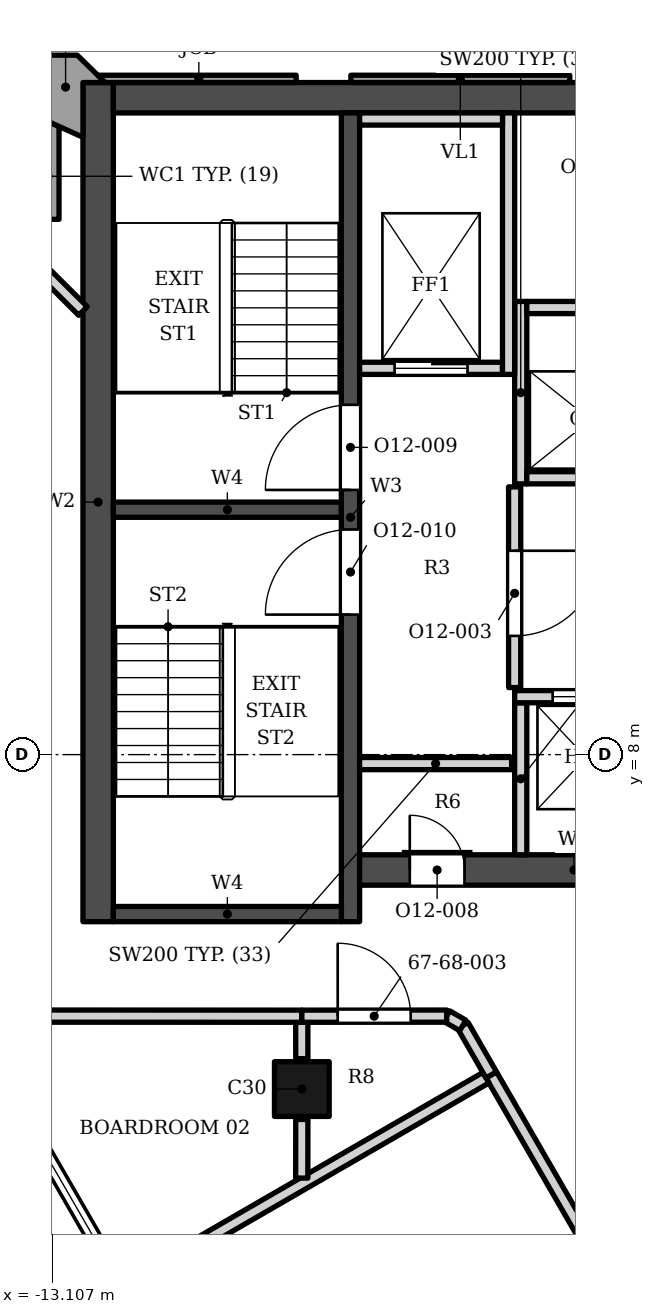
"""IFC4 building model, lengths in metres.
Left out: names, types, materials, properties, quantities, classifications, styles, units other than length and angle.
Written with IfcOpenShell. Run it as: python <this file> out.ifc"""

import sys

from ifc_helpers import new_model, si_unit, direction, frame, frame_2d, origin, origin_2d, place, context, subcontext, project, spatial, polyline, rectangle, outline, extrude, element, fill, save


model = new_model("IFC4")
c1 = context("Model", 3, precision=1e-05, world=origin(), true_north=direction((0.0, 1.0)))
c2 = subcontext(c1, "Body", "Model", "MODEL_VIEW")
j1 = project(units=[si_unit("LENGTHUNIT", "METRE"), si_unit("PLANEANGLEUNIT", "RADIAN")], contexts=[c1])
p1 = place(None, origin())
s1 = spatial("IfcSite", under=j1, at=p1, CompositionType="ELEMENT")
p2 = place(p1, origin())
s2 = spatial("IfcBuilding", under=s1, at=p2, CompositionType="ELEMENT")
p3 = place(p2, frame((0.0, 0.0, 279.4)))
s3 = spatial("IfcBuildingStorey", under=s2, at=p3, CompositionType="ELEMENT", Elevation=279.4)
p4 = place(p3, frame((-12.1, 18.802, 0.0), z_axis=(0.0, 0.0, 1.0), x_axis=(1.0, 0.0, 0.0)))
e1 = element("IfcWall", 1, at=p4, inside=s3, PredefinedType="SHEAR", context=c2, shape_type="SweptSolid", body=[
    extrude(rectangle(XDim=24.2, YDim=0.5, at=frame_2d((12.1, 0.0))), origin(), (0.0, 0.0, 1.0), 3.9),
])
p5 = place(p3, frame((-12.35, 5.253, 0.0), z_axis=(0.0, 0.0, 1.0), x_axis=(0.0, 1.0, 0.0)))
e2 = element("IfcWall", 2, at=p5, inside=s3, PredefinedType="SHEAR", context=c2, shape_type="SweptSolid", body=[
    extrude(rectangle(XDim=13.8, YDim=0.5, at=frame_2d((6.9, 0.0))), origin(), (0.0, 0.0, 1.0), 3.9),
])
p6 = place(p3, frame((-8.2, 5.253, 0.0), z_axis=(0.0, 0.0, 1.0), x_axis=(0.0, 1.0, 0.0)))
e3 = element("IfcWall", 3, at=p6, inside=s3, PredefinedType="SHEAR", context=c2, shape_type="SweptSolid", body=[
    extrude(rectangle(XDim=13.3, YDim=0.3, at=frame_2d((6.65, 0.0))), origin(), (0.0, 0.0, 1.0), 3.9),
])
p7 = place(p6, frame((7.1, 0.0, 0.0)))
e4 = element("IfcOpeningElement", 4, at=p7, cuts=e3, PredefinedType="OPENING", context=c2, shape_type="SweptSolid", body=[
    extrude(rectangle(XDim=1.4, YDim=2.1, at=frame_2d((0.7, 1.05))), frame((0.0, 0.16, 0.0), z_axis=(0.0, -1.0, 0.0), x_axis=(1.0, 0.0, 0.0)), (0.0, 0.0, 1.0), 0.32),
])
p8 = place(p6, frame((5.05, 0.0, 0.0)))
e5 = element("IfcOpeningElement", 5, at=p8, cuts=e3, PredefinedType="OPENING", context=c2, shape_type="SweptSolid", body=[
    extrude(rectangle(XDim=1.4, YDim=2.1, at=frame_2d((0.7, 1.05))), frame((0.0, 0.16, 0.0), z_axis=(0.0, -1.0, 0.0), x_axis=(1.0, 0.0, 0.0)), (0.0, 0.0, 1.0), 0.32),
])
for number, where, z_axis, x_axis in (
    (6, (-12.1, 12.028, 0.0), (0.0, 0.0, 1.0), (1.0, 0.0, 0.0)),
    (7, (-12.1, 5.378, 0.0), (0.0, 0.0, 1.0), (1.0, 0.0, 0.0)),
):
    element("IfcWall", number, at=place(p3, frame(where, z_axis=z_axis, x_axis=x_axis)), inside=s3, PredefinedType="SHEAR", context=c2, shape_type="SweptSolid", body=[
        extrude(rectangle(XDim=3.75, YDim=0.25, at=frame_2d((1.875, 0.0))), origin(), (0.0, 0.0, 1.0), 3.9),
    ])
p9 = place(p3, frame((-8.05, 6.103, 0.0), z_axis=(0.0, 0.0, 1.0), x_axis=(1.0, 0.0, 0.0)))
e8 = element("IfcWall", 8, at=p9, inside=s3, PredefinedType="SHEAR", context=c2, shape_type="SweptSolid", body=[
    extrude(rectangle(XDim=7.05, YDim=0.5, at=frame_2d((3.525, 0.0))), origin(), (0.0, 0.0, 1.0), 3.9),
])
p10 = place(p9, frame((0.825, 0.0, 0.0)))
e9 = element("IfcOpeningElement", 9, at=p10, cuts=e8, PredefinedType="OPENING", context=c2, shape_type="SweptSolid", body=[
    extrude(rectangle(XDim=0.9, YDim=2.1, at=frame_2d((0.45, 1.05))), frame((0.0, 0.26, 0.0), z_axis=(0.0, -1.0, 0.0), x_axis=(1.0, 0.0, 0.0)), (0.0, 0.0, 1.0), 0.52),
])
p11 = place(p3, frame((-9.0, 2.5, 0.0), z_axis=(0.0, 0.0, 1.0), x_axis=(1.0, 0.0, 0.0)))
e10 = element("IfcColumn", 10, at=p11, inside=s3, PredefinedType="COLUMN", context=c2, shape_type="SweptSolid", body=[
    extrude(rectangle(XDim=0.9, YDim=0.9, at=origin_2d()), origin(), (0.0, 0.0, 1.0), 3.9),
])
p12 = place(p3, frame((-14.12, 3.001, 0.0), z_axis=(0.0, 0.0, 1.0), x_axis=(0.49998411664, -0.866034573852, 0.0)))
e11 = element("IfcWall", 11, at=p12, inside=s3, PredefinedType="ELEMENTEDWALL", context=c2, shape_type="SweptSolid", body=[
    extrude(rectangle(XDim=4.2, YDim=0.2, at=frame_2d((2.1, 0.0))), origin(), (0.0, 0.0, 1.0), 3.0),
])
p13 = place(p12, frame((0.2, 0.0, 0.45)))
e12 = element("IfcOpeningElement", 12, at=p13, cuts=e11, PredefinedType="OPENING", context=c2, shape_type="SweptSolid", body=[
    extrude(rectangle(XDim=3.8, YDim=2.25, at=frame_2d((1.9, 1.125))), frame((0.0, 0.11, 0.0), z_axis=(0.0, -1.0, 0.0), x_axis=(1.0, 0.0, 0.0)), (0.0, 0.0, 1.0), 0.22),
])
p14 = place(p3, origin())
e13 = element("IfcWall", 13, at=p14, inside=s3, PredefinedType="SOLIDWALL", context=c2, shape_type="SweptSolid", body=[
    extrude(outline(polyline([(-12.234, 19.052), (-12.694, 19.502), (-13.594, 19.502), (-13.594, 18.603), (-12.6, 18.152), (-12.6, 19.052), (-12.234, 19.052)])), origin(), (0.0, 0.0, 1.0), 3.0),
])
p15 = place(p3, origin())
e14 = element("IfcWall", 14, at=p15, inside=s3, PredefinedType="SOLIDWALL", context=c2, shape_type="SweptSolid", body=[
    extrude(outline(polyline([(-13.294, 16.802), (-12.994, 16.802), (-12.994, 18.331), (-13.294, 18.467), (-13.294, 17.153), (-13.294, 16.802)])), origin(), (0.0, 0.0, 1.0), 3.0),
])
p16 = place(p3, origin())
e15 = element("IfcWall", 15, at=p16, inside=s3, PredefinedType="ELEMENTEDWALL", context=c2, shape_type="SweptSolid", body=[
    extrude(outline(polyline([(-8.194, 19.173), (-8.194, 19.052), (-4.594, 19.052), (-4.594, 19.173), (-8.194, 19.173)])), origin(), (0.0, 0.0, 1.0), 3.0),
])
p17 = place(p3, origin())
e16 = element("IfcWall", 16, at=p17, inside=s3, PredefinedType="SOLIDWALL", context=c2, shape_type="SweptSolid", body=[
    extrude(outline(polyline([(-12.233, 19.052), (-9.094, 19.052), (-9.094, 19.173), (-12.355, 19.173), (-12.233, 19.052)])), origin(), (0.0, 0.0, 1.0), 3.0),
])
for number, where, z_axis, x_axis in (
    (17, (-5.4, 6.353, 0.0), (0.0, 0.0, 1.0), (0.0, 1.0, 0.0)),
    (18, (-8.05, 7.853, 0.0), (0.0, 0.0, 1.0), (1.0, 0.0, 0.0)),
):
    element("IfcWall", number, at=place(p3, frame(where, z_axis=z_axis, x_axis=x_axis)), inside=s3, PredefinedType="SOLIDWALL", context=c2, shape_type="SweptSolid", body=[
        extrude(rectangle(XDim=2.5, YDim=0.2, at=frame_2d((1.25, 0.0))), origin(), (0.0, 0.0, 1.0), 3.73),
    ])
p18 = place(p3, frame((-5.5, 8.953, 0.0), z_axis=(0.0, 0.0, 1.0), x_axis=(1.0, 0.0, 0.0)))
e19 = element("IfcWall", 19, at=p18, inside=s3, PredefinedType="SOLIDWALL", context=c2, shape_type="SweptSolid", body=[
    extrude(rectangle(XDim=4.5, YDim=0.2, at=frame_2d((2.25, 0.0))), origin(), (0.0, 0.0, 1.0), 3.73),
])
p19 = place(p18, frame((0.625, 0.0, 0.0)))
e20 = element("IfcOpeningElement", 20, at=p19, cuts=e19, PredefinedType="OPENING", context=c2, shape_type="SweptSolid", body=[
    extrude(rectangle(XDim=1.1, YDim=2.1, at=frame_2d((0.55, 1.05))), frame((0.0, 0.11, 0.0), z_axis=(0.0, -1.0, 0.0), x_axis=(1.0, 0.0, 0.0)), (0.0, 0.0, 1.0), 0.22),
])
p20 = place(p18, frame((2.775, 0.0, 0.0)))
e21 = element("IfcOpeningElement", 21, at=p20, cuts=e19, PredefinedType="OPENING", context=c2, shape_type="SweptSolid", body=[
    extrude(rectangle(XDim=1.1, YDim=2.1, at=frame_2d((0.55, 1.05))), frame((0.0, 0.11, 0.0), z_axis=(0.0, -1.0, 0.0), x_axis=(1.0, 0.0, 0.0)), (0.0, 0.0, 1.0), 0.22),
])
p21 = place(p3, frame((-5.5, 9.103, 0.0), z_axis=(0.0, 0.0, 1.0), x_axis=(0.0, 1.0, 0.0)))
e22 = element("IfcWall", 22, at=p21, inside=s3, PredefinedType="SOLIDWALL", context=c2, shape_type="SweptSolid", body=[
    extrude(rectangle(XDim=3.3, YDim=0.2, at=frame_2d((1.65, 0.0))), origin(), (0.0, 0.0, 1.0), 3.73),
])
p22 = place(p21, frame((0.85, 0.0, 0.0)))
e23 = element("IfcOpeningElement", 23, at=p22, cuts=e22, PredefinedType="OPENING", context=c2, shape_type="SweptSolid", body=[
    extrude(rectangle(XDim=1.4, YDim=2.1, at=frame_2d((0.7, 1.05))), frame((0.0, 0.11, 0.0), z_axis=(0.0, -1.0, 0.0), x_axis=(1.0, 0.0, 0.0)), (0.0, 0.0, 1.0), 0.22),
])
p23 = place(p3, frame((-5.4, 12.453, 0.0), z_axis=(0.0, 0.0, 1.0), x_axis=(0.0, 1.0, 0.0)))
e24 = element("IfcWall", 24, at=p23, inside=s3, PredefinedType="SOLIDWALL", context=c2, shape_type="SweptSolid", body=[
    extrude(rectangle(XDim=3.0, YDim=0.2, at=frame_2d((1.5, 0.0))), origin(), (0.0, 0.0, 1.0), 3.73),
])
p24 = place(p3, frame((-5.3, 12.552, 0.0), z_axis=(0.0, 0.0, 1.0), x_axis=(1.0, 0.0, 0.0)))
e25 = element("IfcWall", 25, at=p24, inside=s3, PredefinedType="SOLIDWALL", context=c2, shape_type="SweptSolid", body=[
    extrude(rectangle(XDim=2.1, YDim=0.2, at=frame_2d((1.05, 0.0))), origin(), (0.0, 0.0, 1.0), 3.73),
])
p25 = place(p3, frame((-8.05, 14.353, 0.0), z_axis=(0.0, 0.0, 1.0), x_axis=(1.0, 0.0, 0.0)))
e26 = element("IfcWall", 26, at=p25, inside=s3, PredefinedType="SOLIDWALL", context=c2, shape_type="SweptSolid", body=[
    extrude(rectangle(XDim=2.35, YDim=0.2, at=frame_2d((1.175, 0.0))), origin(), (0.0, 0.0, 1.0), 3.73),
])
p26 = place(p25, frame((0.575, 0.0, 0.0)))
e27 = element("IfcOpeningElement", 27, at=p26, cuts=e26, PredefinedType="OPENING", context=c2, shape_type="SweptSolid", body=[
    extrude(rectangle(XDim=1.2, YDim=2.1, at=frame_2d((0.6, 1.05))), frame((0.0, 0.11, 0.0), z_axis=(0.0, -1.0, 0.0), x_axis=(1.0, 0.0, 0.0)), (0.0, 0.0, 1.0), 0.22),
])
p27 = place(p3, frame((-5.6, 14.253, 0.0), z_axis=(0.0, 0.0, 1.0), x_axis=(0.0, 1.0, 0.0)))
e28 = element("IfcWall", 28, at=p27, inside=s3, PredefinedType="SOLIDWALL", context=c2, shape_type="SweptSolid", body=[
    extrude(rectangle(XDim=4.3, YDim=0.2, at=frame_2d((2.15, 0.0))), origin(), (0.0, 0.0, 1.0), 3.73),
])
p28 = place(p3, frame((-5.3, 15.353, 0.0), z_axis=(0.0, 0.0, 1.0), x_axis=(1.0, 0.0, 0.0)))
e29 = element("IfcWall", 29, at=p28, inside=s3, PredefinedType="SOLIDWALL", context=c2, shape_type="SweptSolid", body=[
    extrude(rectangle(XDim=2.1, YDim=0.2, at=frame_2d((1.05, 0.0))), origin(), (0.0, 0.0, 1.0), 3.73),
])
p29 = place(p3, frame((-8.05, 18.453, 0.0), z_axis=(0.0, 0.0, 1.0), x_axis=(1.0, 0.0, 0.0)))
e30 = element("IfcWall", 30, at=p29, inside=s3, PredefinedType="SOLIDWALL", context=c2, shape_type="SweptSolid", body=[
    extrude(rectangle(XDim=2.35, YDim=0.2, at=frame_2d((1.175, 0.0))), origin(), (0.0, 0.0, 1.0), 3.73),
])
p30 = place(p3, frame((-5.885, 2.733, 0.0), z_axis=(0.0, 0.0, 1.0), x_axis=(0.499999199346, -0.866025866042, 0.0)))
e31 = element("IfcWall", 31, at=p30, inside=s3, PredefinedType="PARTITIONING", context=c2, shape_type="SweptSolid", body=[
    extrude(rectangle(XDim=12.04, YDim=0.2, at=frame_2d((6.02, 0.0))), origin(), (0.0, 0.0, 1.0), 2.884),
])
p31 = place(p30, frame((4.0, 0.0, 0.0)))
e32 = element("IfcOpeningElement", 32, at=p31, cuts=e31, PredefinedType="OPENING", context=c2, shape_type="SweptSolid", body=[
    extrude(rectangle(XDim=1.0, YDim=2.4, at=frame_2d((0.5, 1.2))), frame((0.0, 0.11, 0.0), z_axis=(0.0, -1.0, 0.0), x_axis=(1.0, 0.0, 0.0)), (0.0, 0.0, 1.0), 0.22),
])
p32 = place(p30, frame((9.52, 0.0, 0.0)))
e33 = element("IfcOpeningElement", 33, at=p32, cuts=e31, PredefinedType="OPENING", context=c2, shape_type="SweptSolid", body=[
    extrude(rectangle(XDim=1.8, YDim=2.4, at=frame_2d((0.9, 1.2))), frame((0.0, 0.11, 0.0), z_axis=(0.0, -1.0, 0.0), x_axis=(1.0, 0.0, 0.0)), (0.0, 0.0, 1.0), 0.22),
])
p33 = place(p3, frame((-11.556, -0.541, 0.0), z_axis=(0.0, 0.0, 1.0), x_axis=(0.865781982927, 0.500421380478, 0.0)))
e34 = element("IfcWall", 34, at=p33, inside=s3, PredefinedType="PARTITIONING", context=c2, shape_type="SweptSolid", body=[
    extrude(rectangle(XDim=6.45, YDim=0.2, at=frame_2d((3.225, 0.0))), origin(), (0.0, 0.0, 1.0), 3.202),
])
p34 = place(p3, frame((-9.002, 1.036, 0.0), z_axis=(0.0, 0.0, 1.0), x_axis=(0.001518985589, 0.999998846341, 0.0)))
e35 = element("IfcWall", 35, at=p34, inside=s3, PredefinedType="PARTITIONING", context=c2, shape_type="SweptSolid", body=[
    extrude(rectangle(XDim=0.964, YDim=0.2, at=frame_2d((0.482, 0.0))), origin(), (0.0, 0.0, 1.0), 3.202),
])
p35 = place(p3, frame((-6.353, 3.546, 0.0), z_axis=(0.0, 0.0, 1.0), x_axis=(0.498715622975, -0.86676567041, 0.0)))
e36 = element("IfcWall", 36, at=p35, inside=s3, PredefinedType="PARTITIONING", context=c2, shape_type="SweptSolid", body=[
    extrude(rectangle(XDim=0.938, YDim=0.2, at=frame_2d((0.469, 0.0))), origin(), (0.0, 0.0, 1.0), 3.73),
])
p36 = place(p3, frame((-9.002, 3.6, 0.0), z_axis=(0.0, 0.0, 1.0), x_axis=(0.002442989453, -0.999997015897, 0.0)))
e37 = element("IfcWall", 37, at=p36, inside=s3, PredefinedType="PARTITIONING", context=c2, shape_type="SweptSolid", body=[
    extrude(rectangle(XDim=0.6, YDim=0.2, at=frame_2d((0.3, 0.0))), origin(), (0.0, 0.0, 1.0), 3.332),
])
p37 = place(p3, frame((-6.618, 3.699, 0.0), z_axis=(0.0, 0.0, 1.0), x_axis=(0.865826662844, -0.500344071524, 0.0)))
e38 = element("IfcWall", 38, at=p37, inside=s3, PredefinedType="PARTITIONING", context=c2, shape_type="SweptSolid", body=[
    extrude(rectangle(XDim=0.306, YDim=0.2, at=frame_2d((0.153, 0.0))), origin(), (0.0, 0.0, 1.0), 3.73),
])
p38 = place(p3, frame((-13.277, 3.7, 0.0), z_axis=(0.0, 0.0, 1.0), x_axis=(0.999999920155, -0.000399611774, 0.0)))
e39 = element("IfcWall", 39, at=p38, inside=s3, PredefinedType="PARTITIONING", context=c2, shape_type="SweptSolid", body=[
    extrude(rectangle(XDim=4.277, YDim=0.2, at=frame_2d((2.138, 0.0))), origin(), (0.0, 0.0, 1.0), 3.73),
])
p39 = place(p3, frame((-9.0, 3.698, 0.0), z_axis=(0.0, 0.0, 1.0), x_axis=(0.999999810961, 0.000614879982, 0.0)))
e40 = element("IfcWall", 40, at=p39, inside=s3, PredefinedType="PARTITIONING", context=c2, shape_type="SweptSolid", body=[
    extrude(rectangle(XDim=2.382, YDim=0.2, at=frame_2d((1.191, 0.0))), origin(), (0.0, 0.0, 1.0), 3.73),
])
p40 = place(p39, frame((0.59, 0.0, 0.0)))
e41 = element("IfcOpeningElement", 41, at=p40, cuts=e40, PredefinedType="OPENING", context=c2, shape_type="SweptSolid", body=[
    extrude(rectangle(XDim=1.2, YDim=2.4, at=frame_2d((0.6, 1.2))), frame((0.0, 0.11, 0.0), z_axis=(0.0, -1.0, 0.0), x_axis=(1.0, 0.0, 0.0)), (0.0, 0.0, 1.0), 0.22),
])
p41 = place(p3, frame((-13.26, 15.953, 0.0), z_axis=(0.0, 0.0, 1.0), x_axis=(0.708285399161, -0.705926195389, 0.0)))
e42 = element("IfcWall", 42, at=p41, inside=s3, PredefinedType="PARTITIONING", context=c2, shape_type="SweptSolid", body=[
    extrude(rectangle(XDim=0.931, YDim=0.2, at=frame_2d((0.466, 0.0))), origin(), (0.0, 0.0, 1.0), 3.73),
])
p42 = place(p13, origin())
e43 = element("IfcWindow", 43, at=p42, inside=s3, PartitioningType="SINGLE_PANEL", PredefinedType="WINDOW", context=c2, shape_type="SweptSolid", body=[
    extrude(rectangle(XDim=3.8, YDim=2.25, at=frame_2d((1.9, 1.125))), frame((0.0, 0.03, 0.0), z_axis=(0.0, -1.0, 0.0), x_axis=(1.0, 0.0, 0.0)), (0.0, 0.0, 1.0), 0.06),
])
fill(e12, e43)
p43 = place(p19, origin())
e44 = element("IfcDoor", 44, at=p43, inside=s3, OperationType="DOUBLE_DOOR_SLIDING", PredefinedType="DOOR", context=c2, shape_type="SweptSolid", body=[
    extrude(rectangle(XDim=1.1, YDim=2.1, at=frame_2d((0.55, 1.05))), frame((0.0, 0.025, 0.0), z_axis=(0.0, -1.0, 0.0), x_axis=(1.0, 0.0, 0.0)), (0.0, 0.0, 1.0), 0.05),
])
fill(e20, e44)
p44 = place(p26, origin())
e45 = element("IfcDoor", 45, at=p44, inside=s3, OperationType="DOUBLE_DOOR_SLIDING", PredefinedType="DOOR", context=c2, shape_type="SweptSolid", body=[
    extrude(rectangle(XDim=1.2, YDim=2.1, at=frame_2d((0.6, 1.05))), frame((0.0, 0.025, 0.0), z_axis=(0.0, -1.0, 0.0), x_axis=(1.0, 0.0, 0.0)), (0.0, 0.0, 1.0), 0.05),
])
fill(e27, e45)
p45 = place(p7, origin())
e46 = element("IfcDoor", 46, at=p45, inside=s3, OperationType="SINGLE_SWING_LEFT", PredefinedType="DOOR", context=c2, shape_type="SweptSolid", body=[
    extrude(rectangle(XDim=1.4, YDim=2.1, at=frame_2d((0.7, 1.05))), frame((0.0, 0.025, 0.0), z_axis=(0.0, -1.0, 0.0), x_axis=(1.0, 0.0, 0.0)), (0.0, 0.0, 1.0), 0.05),
])
fill(e4, e46)
p46 = place(p8, origin())
e47 = element("IfcDoor", 47, at=p46, inside=s3, OperationType="SINGLE_SWING_LEFT", PredefinedType="DOOR", context=c2, shape_type="SweptSolid", body=[
    extrude(rectangle(XDim=1.4, YDim=2.1, at=frame_2d((0.7, 1.05))), frame((0.0, 0.025, 0.0), z_axis=(0.0, -1.0, 0.0), x_axis=(1.0, 0.0, 0.0)), (0.0, 0.0, 1.0), 0.05),
])
fill(e5, e47)
p47 = place(p22, origin())
e48 = element("IfcDoor", 48, at=p47, inside=s3, OperationType="SINGLE_SWING_RIGHT", PredefinedType="DOOR", context=c2, shape_type="SweptSolid", body=[
    extrude(rectangle(XDim=1.4, YDim=2.1, at=frame_2d((0.7, 1.05))), frame((0.0, 0.025, 0.0), z_axis=(0.0, -1.0, 0.0), x_axis=(1.0, 0.0, 0.0)), (0.0, 0.0, 1.0), 0.05),
])
fill(e23, e48)
p48 = place(p10, origin())
e49 = element("IfcDoor", 49, at=p48, inside=s3, OperationType="SINGLE_SWING_LEFT", PredefinedType="DOOR", context=c2, shape_type="SweptSolid", body=[
    extrude(rectangle(XDim=0.9, YDim=2.1, at=frame_2d((0.45, 1.05))), frame((0.0, 0.025, 0.0), z_axis=(0.0, -1.0, 0.0), x_axis=(1.0, 0.0, 0.0)), (0.0, 0.0, 1.0), 0.05),
])
fill(e9, e49)
p49 = place(p40, origin())
e50 = element("IfcDoor", 50, at=p49, inside=s3, OperationType="SINGLE_SWING_LEFT", PredefinedType="DOOR", context=c2, shape_type="SweptSolid", body=[
    extrude(rectangle(XDim=1.2, YDim=2.4, at=frame_2d((0.6, 1.2))), frame((0.0, 0.025, 0.0), z_axis=(0.0, -1.0, 0.0), x_axis=(1.0, 0.0, 0.0)), (0.0, 0.0, 1.0), 0.05),
])
fill(e41, e50)
save(model, sys.argv[1])
